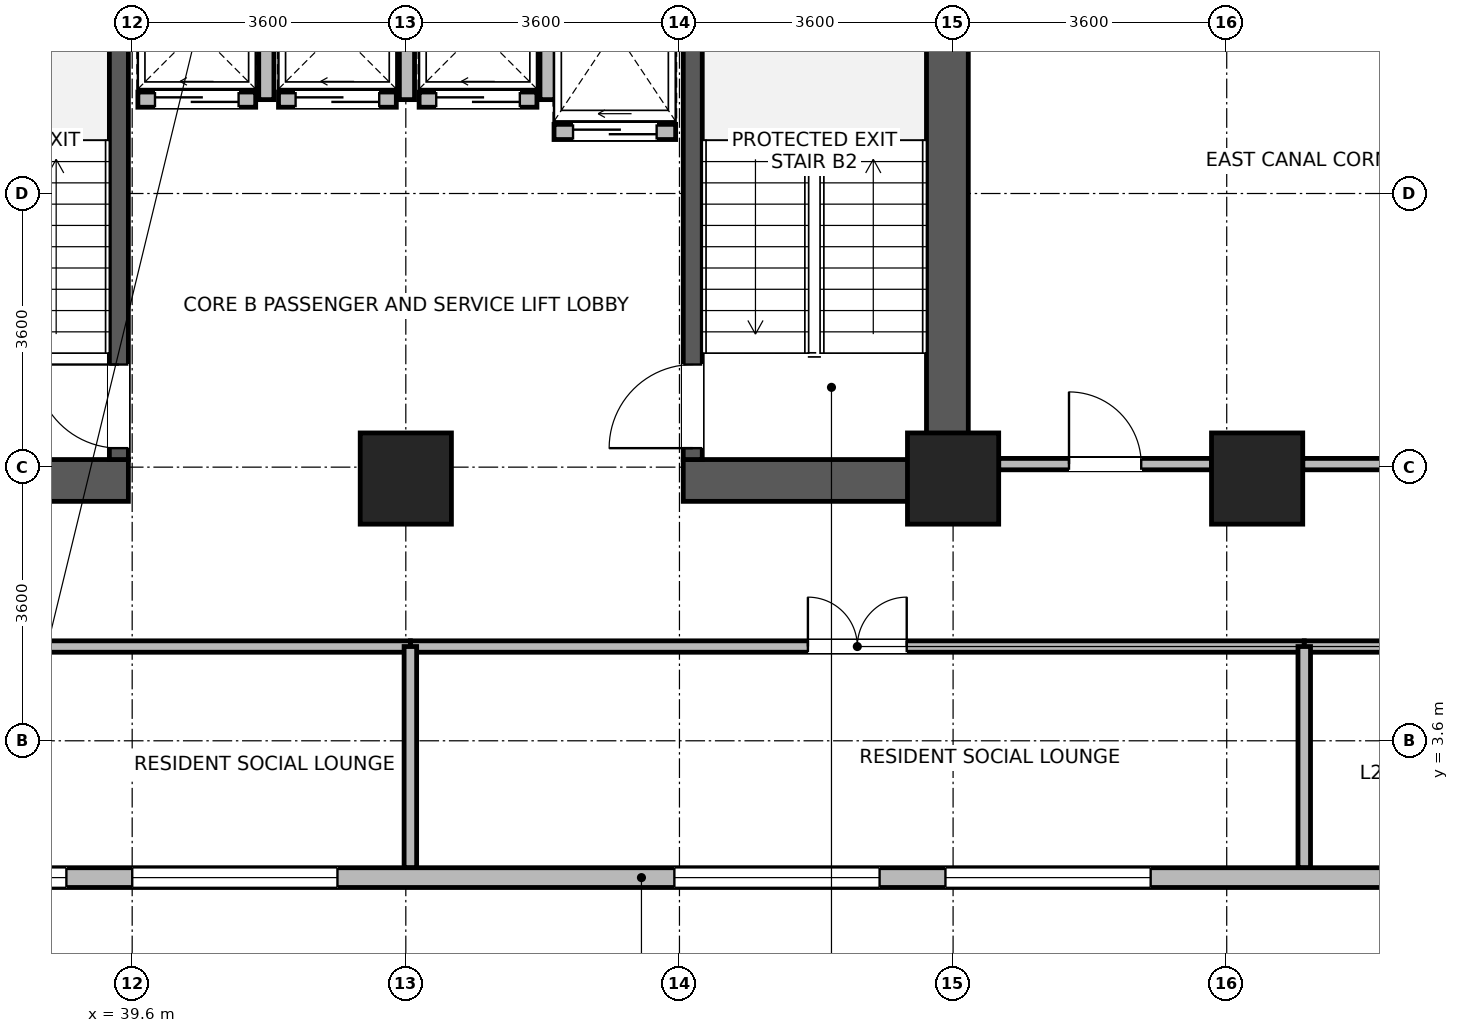
"""IFC4 building model, lengths in metres.
Left out: names, types, materials, properties, quantities, classifications, styles, units other than length and angle.
Written with IfcOpenShell. Run it as: python <this file> out.ifc"""

import sys

from ifc_helpers import new_model, si_unit, direction, frame, frame_2d, origin, origin_2d, place, context, subcontext, project, spatial, rectangle, extrude, source, transform, mapped, element, fill, save


model = new_model("IFC4")
c1 = context("Model", 3, precision=1e-05, world=origin(), true_north=direction((0.0, 1.0)))
c2 = subcontext(c1, "Body", "Model", "MODEL_VIEW")
j1 = project(units=[si_unit("LENGTHUNIT", "METRE"), si_unit("PLANEANGLEUNIT", "RADIAN")], contexts=[c1])
p1 = place(None, origin())
s1 = spatial("IfcSite", under=j1, at=p1, CompositionType="ELEMENT")
p2 = place(p1, origin())
s2 = spatial("IfcBuilding", under=s1, at=p2, CompositionType="ELEMENT")
p3 = place(p2, frame((0.0, 0.0, 82.3)))
s3 = spatial("IfcBuildingStorey", under=s2, at=p3, CompositionType="ELEMENT", Elevation=82.3)
p4 = place(p3, frame((50.325, 6.75, 0.0), z_axis=(0.0, 0.0, 1.0), x_axis=(0.0, 1.0, 0.0)))
e1 = element("IfcWall", 1, at=p4, inside=s3, PredefinedType="SHEAR", context=c2, shape_type="SweptSolid", body=[
    extrude(rectangle(XDim=8.1, YDim=0.55, at=frame_2d((4.05, 0.0))), origin(), (0.0, 0.0, 1.0), 3.45),
])
for number, where, z_axis, x_axis in (
    (2, (36.35, 7.025, 0.0), (0.0, 0.0, 1.0), (1.0, 0.0, 0.0)),
    (3, (46.85, 7.025, 0.0), (0.0, 0.0, 1.0), (1.0, 0.0, 0.0)),
):
    element("IfcWall", number, at=place(p3, frame(where, z_axis=z_axis, x_axis=x_axis)), inside=s3, PredefinedType="SHEAR", context=c2, shape_type="SweptSolid", body=[
        extrude(rectangle(XDim=3.2, YDim=0.55, at=frame_2d((1.6, 0.0))), origin(), (0.0, 0.0, 1.0), 3.45),
    ])
p5 = place(p3, frame((39.425, 7.3, 0.0), z_axis=(0.0, 0.0, 1.0), x_axis=(0.0, 1.0, 0.0)))
e4 = element("IfcWall", 4, at=p5, inside=s3, PredefinedType="SHEAR", context=c2, shape_type="SweptSolid", body=[
    extrude(rectangle(XDim=7.0, YDim=0.25, at=frame_2d((3.5, 0.0))), origin(), (0.0, 0.0, 1.0), 3.45),
])
p6 = place(p5, frame((0.15, 0.0, 0.0)))
e5 = element("IfcOpeningElement", 5, at=p6, cuts=e4, PredefinedType="OPENING", context=c2, shape_type="SweptSolid", body=[
    extrude(rectangle(XDim=1.1, YDim=2.08, at=frame_2d((0.55, 1.04))), frame((0.0, 0.135, 0.0), z_axis=(0.0, -1.0, 0.0), x_axis=(1.0, 0.0, 0.0)), (0.0, 0.0, 1.0), 0.27),
])
p7 = place(p3, frame((46.975, 7.3, 0.0), z_axis=(0.0, 0.0, 1.0), x_axis=(0.0, 1.0, 0.0)))
e6 = element("IfcWall", 6, at=p7, inside=s3, PredefinedType="SHEAR", context=c2, shape_type="SweptSolid", body=[
    extrude(rectangle(XDim=7.0, YDim=0.25, at=frame_2d((3.5, 0.0))), origin(), (0.0, 0.0, 1.0), 3.45),
])
p8 = place(p7, frame((0.15, 0.0, 0.0)))
e7 = element("IfcOpeningElement", 7, at=p8, cuts=e6, PredefinedType="OPENING", context=c2, shape_type="SweptSolid", body=[
    extrude(rectangle(XDim=1.1, YDim=2.08, at=frame_2d((0.55, 1.04))), frame((0.0, 0.135, 0.0), z_axis=(0.0, -1.0, 0.0), x_axis=(1.0, 0.0, 0.0)), (0.0, 0.0, 1.0), 0.27),
])
m1 = source(origin(), c2, "Body", "SweptSolid", [
    extrude(rectangle(XDim=1.2, YDim=1.2, at=origin_2d()), origin(), (0.0, 0.0, 1.0), 3.7),
])
for number, where, z_axis, x_axis in (
    (8, (43.2, 7.05, 0.0), (0.0, 0.0, 1.0), (1.0, 0.0, 0.0)),
    (9, (50.4, 7.05, 0.0), (0.0, 0.0, 1.0), (1.0, 0.0, 0.0)),
    (10, (54.4, 7.05, 0.0), (0.0, 0.0, 1.0), (1.0, 0.0, 0.0)),
):
    element("IfcColumn", number, at=place(p3, frame(where, z_axis=z_axis, x_axis=x_axis)), inside=s3, PredefinedType="COLUMN", context=c2, shape_type="MappedRepresentation", body=[
        mapped(m1, transform((0.0, 0.0, 0.0), x_axis=(1.0, 0.0, 0.0), y_axis=(0.0, 1.0, 0.0), z_axis=(0.0, 0.0, 1.0), scale=1.0)),
    ])
p9 = place(p3, frame((60.565, 1.8, 0.0), z_axis=(0.0, 0.0, 1.0), x_axis=(-1.0, 0.0, 0.0)))
e11 = element("IfcWall", 11, at=p9, inside=s3, PredefinedType="STANDARD", context=c2, shape_type="SweptSolid", body=[
    extrude(rectangle(XDim=28.53, YDim=0.26, at=frame_2d((14.265, 0.0))), origin(), (0.0, 0.0, 1.0), 3.43),
])
p10 = place(p9, frame((0.433, 0.0, 0.85)))
e12 = element("IfcOpeningElement", 12, at=p10, cuts=e11, PredefinedType="OPENING", context=c2, shape_type="SweptSolid", body=[
    extrude(rectangle(XDim=2.7, YDim=2.05, at=frame_2d((1.35, 1.025))), frame((0.0, 0.14, 0.0), z_axis=(0.0, -1.0, 0.0), x_axis=(1.0, 0.0, 0.0)), (0.0, 0.0, 1.0), 0.28),
])
p11 = place(p9, frame((7.566, 0.0, 0.85)))
e13 = element("IfcOpeningElement", 13, at=p11, cuts=e11, PredefinedType="OPENING", context=c2, shape_type="SweptSolid", body=[
    extrude(rectangle(XDim=2.7, YDim=2.05, at=frame_2d((1.35, 1.025))), frame((0.0, 0.14, 0.0), z_axis=(0.0, -1.0, 0.0), x_axis=(1.0, 0.0, 0.0)), (0.0, 0.0, 1.0), 0.28),
])
p12 = place(p9, frame((11.132, 0.0, 0.85)))
e14 = element("IfcOpeningElement", 14, at=p12, cuts=e11, PredefinedType="OPENING", context=c2, shape_type="SweptSolid", body=[
    extrude(rectangle(XDim=2.7, YDim=2.05, at=frame_2d((1.35, 1.025))), frame((0.0, 0.14, 0.0), z_axis=(0.0, -1.0, 0.0), x_axis=(1.0, 0.0, 0.0)), (0.0, 0.0, 1.0), 0.28),
])
p13 = place(p9, frame((18.264, 0.0, 0.85)))
e15 = element("IfcOpeningElement", 15, at=p13, cuts=e11, PredefinedType="OPENING", context=c2, shape_type="SweptSolid", body=[
    extrude(rectangle(XDim=2.7, YDim=2.05, at=frame_2d((1.35, 1.025))), frame((0.0, 0.14, 0.0), z_axis=(0.0, -1.0, 0.0), x_axis=(1.0, 0.0, 0.0)), (0.0, 0.0, 1.0), 0.28),
])
p14 = place(p9, frame((21.831, 0.0, 0.85)))
e16 = element("IfcOpeningElement", 16, at=p14, cuts=e11, PredefinedType="OPENING", context=c2, shape_type="SweptSolid", body=[
    extrude(rectangle(XDim=2.7, YDim=2.05, at=frame_2d((1.35, 1.025))), frame((0.0, 0.14, 0.0), z_axis=(0.0, -1.0, 0.0), x_axis=(1.0, 0.0, 0.0)), (0.0, 0.0, 1.0), 0.28),
])
p15 = place(p9, frame((25.397, 0.0, 0.85)))
e17 = element("IfcOpeningElement", 17, at=p15, cuts=e11, PredefinedType="OPENING", context=c2, shape_type="SweptSolid", body=[
    extrude(rectangle(XDim=2.7, YDim=2.05, at=frame_2d((1.35, 1.025))), frame((0.0, 0.14, 0.0), z_axis=(0.0, -1.0, 0.0), x_axis=(1.0, 0.0, 0.0)), (0.0, 0.0, 1.0), 0.28),
])
p16 = place(p3, frame((39.675, 12.035, 0.0), z_axis=(0.0, 0.0, 1.0), x_axis=(1.0, 0.0, 0.0)))
e18 = element("IfcWall", 18, at=p16, inside=s3, PredefinedType="PARTITIONING", context=c2, shape_type="SweptSolid", body=[
    extrude(rectangle(XDim=1.55, YDim=0.2, at=frame_2d((0.775, 0.0))), origin(), (0.0, 0.0, 1.0), 3.43),
])
p17 = place(p16, frame((0.225, 0.0, 0.0)))
e19 = element("IfcOpeningElement", 19, at=p17, cuts=e18, PredefinedType="OPENING", context=c2, shape_type="SweptSolid", body=[
    extrude(rectangle(XDim=1.1, YDim=2.12, at=frame_2d((0.55, 1.06))), frame((0.0, 0.11, 0.0), z_axis=(0.0, -1.0, 0.0), x_axis=(1.0, 0.0, 0.0)), (0.0, 0.0, 1.0), 0.22),
])
p18 = place(p3, frame((41.365, 12.035, 0.0), z_axis=(0.0, 0.0, 1.0), x_axis=(0.0, 1.0, 0.0)))
e20 = element("IfcWall", 20, at=p18, inside=s3, PredefinedType="PARTITIONING", context=c2, shape_type="SweptSolid", body=[
    extrude(rectangle(XDim=1.83, YDim=0.2, at=frame_2d((0.915, 0.0))), origin(), (0.0, 0.0, 1.0), 3.43),
])
p19 = place(p3, frame((41.525, 12.035, 0.0), z_axis=(0.0, 0.0, 1.0), x_axis=(1.0, 0.0, 0.0)))
e21 = element("IfcWall", 21, at=p19, inside=s3, PredefinedType="PARTITIONING", context=c2, shape_type="SweptSolid", body=[
    extrude(rectangle(XDim=1.55, YDim=0.2, at=frame_2d((0.775, 0.0))), origin(), (0.0, 0.0, 1.0), 3.43),
])
p20 = place(p19, frame((0.225, 0.0, 0.0)))
e22 = element("IfcOpeningElement", 22, at=p20, cuts=e21, PredefinedType="OPENING", context=c2, shape_type="SweptSolid", body=[
    extrude(rectangle(XDim=1.1, YDim=2.12, at=frame_2d((0.55, 1.06))), frame((0.0, 0.11, 0.0), z_axis=(0.0, -1.0, 0.0), x_axis=(1.0, 0.0, 0.0)), (0.0, 0.0, 1.0), 0.22),
])
p21 = place(p3, frame((43.215, 12.035, 0.0), z_axis=(0.0, 0.0, 1.0), x_axis=(0.0, 1.0, 0.0)))
e23 = element("IfcWall", 23, at=p21, inside=s3, PredefinedType="PARTITIONING", context=c2, shape_type="SweptSolid", body=[
    extrude(rectangle(XDim=1.83, YDim=0.2, at=frame_2d((0.915, 0.0))), origin(), (0.0, 0.0, 1.0), 3.43),
])
p22 = place(p3, frame((43.375, 12.035, 0.0), z_axis=(0.0, 0.0, 1.0), x_axis=(1.0, 0.0, 0.0)))
e24 = element("IfcWall", 24, at=p22, inside=s3, PredefinedType="PARTITIONING", context=c2, shape_type="SweptSolid", body=[
    extrude(rectangle(XDim=1.55, YDim=0.2, at=frame_2d((0.775, 0.0))), origin(), (0.0, 0.0, 1.0), 3.43),
])
p23 = place(p22, frame((0.225, 0.0, 0.0)))
e25 = element("IfcOpeningElement", 25, at=p23, cuts=e24, PredefinedType="OPENING", context=c2, shape_type="SweptSolid", body=[
    extrude(rectangle(XDim=1.1, YDim=2.12, at=frame_2d((0.55, 1.06))), frame((0.0, 0.11, 0.0), z_axis=(0.0, -1.0, 0.0), x_axis=(1.0, 0.0, 0.0)), (0.0, 0.0, 1.0), 0.22),
])
p24 = place(p3, frame((45.065, 12.035, 0.0), z_axis=(0.0, 0.0, 1.0), x_axis=(0.0, 1.0, 0.0)))
e26 = element("IfcWall", 26, at=p24, inside=s3, PredefinedType="PARTITIONING", context=c2, shape_type="SweptSolid", body=[
    extrude(rectangle(XDim=1.83, YDim=0.2, at=frame_2d((0.915, 0.0))), origin(), (0.0, 0.0, 1.0), 3.43),
])
p25 = place(p3, frame((45.15, 11.61, 0.0), z_axis=(0.0, 0.0, 1.0), x_axis=(1.0, 0.0, 0.0)))
e27 = element("IfcWall", 27, at=p25, inside=s3, PredefinedType="PARTITIONING", context=c2, shape_type="SweptSolid", body=[
    extrude(rectangle(XDim=1.6, YDim=0.2, at=frame_2d((0.8, 0.0))), origin(), (0.0, 0.0, 1.0), 3.43),
])
p26 = place(p25, frame((0.25, 0.0, 0.0)))
e28 = element("IfcOpeningElement", 28, at=p26, cuts=e27, PredefinedType="OPENING", context=c2, shape_type="SweptSolid", body=[
    extrude(rectangle(XDim=1.1, YDim=2.12, at=frame_2d((0.55, 1.06))), frame((0.0, 0.11, 0.0), z_axis=(0.0, -1.0, 0.0), x_axis=(1.0, 0.0, 0.0)), (0.0, 0.0, 1.0), 0.22),
])
p27 = place(p3, frame((43.26, 4.84, 0.0), z_axis=(0.0, 0.0, 1.0), x_axis=(1.0, 0.0, 0.0)))
e29 = element("IfcWall", 29, at=p27, inside=s3, PredefinedType="PARTITIONING", context=c2, shape_type="SweptSolid", body=[
    extrude(rectangle(XDim=11.76, YDim=0.15, at=frame_2d((5.88, 0.0))), origin(), (0.0, 0.0, 1.0), 3.43),
])
p28 = place(p27, frame((5.23, 0.0, 0.0)))
e30 = element("IfcOpeningElement", 30, at=p28, cuts=e29, PredefinedType="OPENING", context=c2, shape_type="SweptSolid", body=[
    extrude(rectangle(XDim=1.3, YDim=2.12, at=frame_2d((0.65, 1.06))), frame((0.0, 0.085, 0.0), z_axis=(0.0, -1.0, 0.0), x_axis=(1.0, 0.0, 0.0)), (0.0, 0.0, 1.0), 0.17),
])
p29 = place(p3, frame((32.032, 4.84, 0.0), z_axis=(0.0, 0.0, 1.0), x_axis=(1.0, 0.0, 0.0)))
e31 = element("IfcWall", 31, at=p29, inside=s3, PredefinedType="PARTITIONING", context=c2, shape_type="SweptSolid", body=[
    extrude(rectangle(XDim=11.228, YDim=0.15, at=frame_2d((5.614, 0.0))), origin(), (0.0, 0.0, 1.0), 3.43),
])
p30 = place(p29, frame((4.964, 0.0, 0.0)))
e32 = element("IfcOpeningElement", 32, at=p30, cuts=e31, PredefinedType="OPENING", context=c2, shape_type="SweptSolid", body=[
    extrude(rectangle(XDim=1.3, YDim=2.12, at=frame_2d((0.65, 1.06))), frame((0.0, 0.085, 0.0), z_axis=(0.0, -1.0, 0.0), x_axis=(1.0, 0.0, 0.0)), (0.0, 0.0, 1.0), 0.17),
])
p31 = place(p3, frame((51.0, 7.24, 0.0), z_axis=(0.0, 0.0, 1.0), x_axis=(1.0, 0.0, 0.0)))
e33 = element("IfcWall", 33, at=p31, inside=s3, PredefinedType="PARTITIONING", context=c2, shape_type="SweptSolid", body=[
    extrude(rectangle(XDim=2.8, YDim=0.15, at=frame_2d((1.4, 0.0))), origin(), (0.0, 0.0, 1.0), 2.78),
])
p32 = place(p31, frame((0.925, 0.0, 0.0)))
e34 = element("IfcOpeningElement", 34, at=p32, cuts=e33, PredefinedType="OPENING", context=c2, shape_type="SweptSolid", body=[
    extrude(rectangle(XDim=0.95, YDim=2.1, at=frame_2d((0.475, 1.05))), frame((0.0, 0.085, 0.0), z_axis=(0.0, -1.0, 0.0), x_axis=(1.0, 0.0, 0.0)), (0.0, 0.0, 1.0), 0.17),
])
p33 = place(p3, frame((55.0, 7.24, 0.0), z_axis=(0.0, 0.0, 1.0), x_axis=(1.0, 0.0, 0.0)))
e35 = element("IfcWall", 35, at=p33, inside=s3, PredefinedType="PARTITIONING", context=c2, shape_type="SweptSolid", body=[
    extrude(rectangle(XDim=5.496, YDim=0.15, at=frame_2d((2.748, 0.0))), origin(), (0.0, 0.0, 1.0), 2.78),
])
p34 = place(p3, frame((55.02, 4.84, 0.0), z_axis=(0.0, 0.0, 1.0), x_axis=(1.0, 0.0, 0.0)))
e36 = element("IfcWall", 36, at=p34, inside=s3, PredefinedType="PARTITIONING", context=c2, shape_type="SweptSolid", body=[
    extrude(rectangle(XDim=5.548, YDim=0.15, at=frame_2d((2.774, 0.0))), origin(), (0.0, 0.0, 1.0), 3.43),
])
p35 = place(p34, frame((2.299, 0.0, 0.0)))
e37 = element("IfcOpeningElement", 37, at=p35, cuts=e36, PredefinedType="OPENING", context=c2, shape_type="SweptSolid", body=[
    extrude(rectangle(XDim=0.95, YDim=2.1, at=frame_2d((0.475, 1.05))), frame((0.0, 0.085, 0.0), z_axis=(0.0, -1.0, 0.0), x_axis=(1.0, 0.0, 0.0)), (0.0, 0.0, 1.0), 0.17),
])
for number, where, z_axis, x_axis in (
    (38, (43.26, 1.932, 0.0), (0.0, 0.0, 1.0), (0.0, 1.0, 0.0)),
    (39, (55.02, 1.932, 0.0), (0.0, 0.0, 1.0), (0.0, 1.0, 0.0)),
):
    element("IfcWall", number, at=place(p3, frame(where, z_axis=z_axis, x_axis=x_axis)), inside=s3, PredefinedType="PARTITIONING", context=c2, shape_type="SweptSolid", body=[
        extrude(rectangle(XDim=2.908, YDim=0.165, at=frame_2d((1.454, 0.0))), origin(), (0.0, 0.0, 1.0), 3.43),
    ])
p36 = place(p11, origin())
e40 = element("IfcWindow", 40, at=p36, inside=s3, PartitioningType="SINGLE_PANEL", PredefinedType="WINDOW", context=c2, shape_type="SweptSolid", body=[
    extrude(rectangle(XDim=2.7, YDim=2.05, at=frame_2d((1.35, 1.025))), frame((0.0, 0.03, 0.0), z_axis=(0.0, -1.0, 0.0), x_axis=(1.0, 0.0, 0.0)), (0.0, 0.0, 1.0), 0.06),
])
fill(e13, e40)
p37 = place(p12, origin())
e41 = element("IfcWindow", 41, at=p37, inside=s3, PartitioningType="SINGLE_PANEL", PredefinedType="WINDOW", context=c2, shape_type="SweptSolid", body=[
    extrude(rectangle(XDim=2.7, YDim=2.05, at=frame_2d((1.35, 1.025))), frame((0.0, 0.03, 0.0), z_axis=(0.0, -1.0, 0.0), x_axis=(1.0, 0.0, 0.0)), (0.0, 0.0, 1.0), 0.06),
])
fill(e14, e41)
p38 = place(p13, origin())
e42 = element("IfcWindow", 42, at=p38, inside=s3, PartitioningType="SINGLE_PANEL", PredefinedType="WINDOW", context=c2, shape_type="SweptSolid", body=[
    extrude(rectangle(XDim=2.7, YDim=2.05, at=frame_2d((1.35, 1.025))), frame((0.0, 0.03, 0.0), z_axis=(0.0, -1.0, 0.0), x_axis=(1.0, 0.0, 0.0)), (0.0, 0.0, 1.0), 0.06),
])
fill(e15, e42)
p39 = place(p14, origin())
e43 = element("IfcWindow", 43, at=p39, inside=s3, PartitioningType="SINGLE_PANEL", PredefinedType="WINDOW", context=c2, shape_type="SweptSolid", body=[
    extrude(rectangle(XDim=2.7, YDim=2.05, at=frame_2d((1.35, 1.025))), frame((0.0, 0.03, 0.0), z_axis=(0.0, -1.0, 0.0), x_axis=(1.0, 0.0, 0.0)), (0.0, 0.0, 1.0), 0.06),
])
fill(e16, e43)
p40 = place(p6, origin())
e44 = element("IfcDoor", 44, at=p40, inside=s3, OperationType="SINGLE_SWING_RIGHT", PredefinedType="DOOR", context=c2, shape_type="SweptSolid", body=[
    extrude(rectangle(XDim=1.1, YDim=2.08, at=frame_2d((0.55, 1.04))), frame((0.0, 0.025, 0.0), z_axis=(0.0, -1.0, 0.0), x_axis=(1.0, 0.0, 0.0)), (0.0, 0.0, 1.0), 0.05),
])
fill(e5, e44)
p41 = place(p8, origin())
e45 = element("IfcDoor", 45, at=p41, inside=s3, OperationType="SINGLE_SWING_LEFT", PredefinedType="DOOR", context=c2, shape_type="SweptSolid", body=[
    extrude(rectangle(XDim=1.1, YDim=2.08, at=frame_2d((0.55, 1.04))), frame((0.0, 0.025, 0.0), z_axis=(0.0, -1.0, 0.0), x_axis=(1.0, 0.0, 0.0)), (0.0, 0.0, 1.0), 0.05),
])
fill(e7, e45)
p42 = place(p17, origin())
e46 = element("IfcDoor", 46, at=p42, inside=s3, OperationType="SLIDING_TO_LEFT", PredefinedType="DOOR", context=c2, shape_type="SweptSolid", body=[
    extrude(rectangle(XDim=1.1, YDim=2.12, at=frame_2d((0.55, 1.06))), frame((0.0, 0.025, 0.0), z_axis=(0.0, -1.0, 0.0), x_axis=(1.0, 0.0, 0.0)), (0.0, 0.0, 1.0), 0.05),
])
fill(e19, e46)
p43 = place(p20, origin())
e47 = element("IfcDoor", 47, at=p43, inside=s3, OperationType="SLIDING_TO_LEFT", PredefinedType="DOOR", context=c2, shape_type="SweptSolid", body=[
    extrude(rectangle(XDim=1.1, YDim=2.12, at=frame_2d((0.55, 1.06))), frame((0.0, 0.025, 0.0), z_axis=(0.0, -1.0, 0.0), x_axis=(1.0, 0.0, 0.0)), (0.0, 0.0, 1.0), 0.05),
])
fill(e22, e47)
p44 = place(p23, origin())
e48 = element("IfcDoor", 48, at=p44, inside=s3, OperationType="SLIDING_TO_LEFT", PredefinedType="DOOR", context=c2, shape_type="SweptSolid", body=[
    extrude(rectangle(XDim=1.1, YDim=2.12, at=frame_2d((0.55, 1.06))), frame((0.0, 0.025, 0.0), z_axis=(0.0, -1.0, 0.0), x_axis=(1.0, 0.0, 0.0)), (0.0, 0.0, 1.0), 0.05),
])
fill(e25, e48)
p45 = place(p26, origin())
e49 = element("IfcDoor", 49, at=p45, inside=s3, OperationType="SLIDING_TO_LEFT", PredefinedType="DOOR", context=c2, shape_type="SweptSolid", body=[
    extrude(rectangle(XDim=1.1, YDim=2.12, at=frame_2d((0.55, 1.06))), frame((0.0, 0.025, 0.0), z_axis=(0.0, -1.0, 0.0), x_axis=(1.0, 0.0, 0.0)), (0.0, 0.0, 1.0), 0.05),
])
fill(e28, e49)
p46 = place(p28, origin())
e50 = element("IfcDoor", 50, at=p46, inside=s3, OperationType="DOUBLE_DOOR_SINGLE_SWING", PredefinedType="DOOR", context=c2, shape_type="SweptSolid", body=[
    extrude(rectangle(XDim=1.3, YDim=2.12, at=frame_2d((0.65, 1.06))), frame((0.0, 0.025, 0.0), z_axis=(0.0, -1.0, 0.0), x_axis=(1.0, 0.0, 0.0)), (0.0, 0.0, 1.0), 0.05),
])
fill(e30, e50)
p47 = place(p32, origin())
e51 = element("IfcDoor", 51, at=p47, inside=s3, OperationType="SINGLE_SWING_LEFT", PredefinedType="DOOR", context=c2, shape_type="SweptSolid", body=[
    extrude(rectangle(XDim=0.95, YDim=2.1, at=frame_2d((0.475, 1.05))), frame((0.0, 0.025, 0.0), z_axis=(0.0, -1.0, 0.0), x_axis=(1.0, 0.0, 0.0)), (0.0, 0.0, 1.0), 0.05),
])
fill(e34, e51)
save(model, sys.argv[1])
